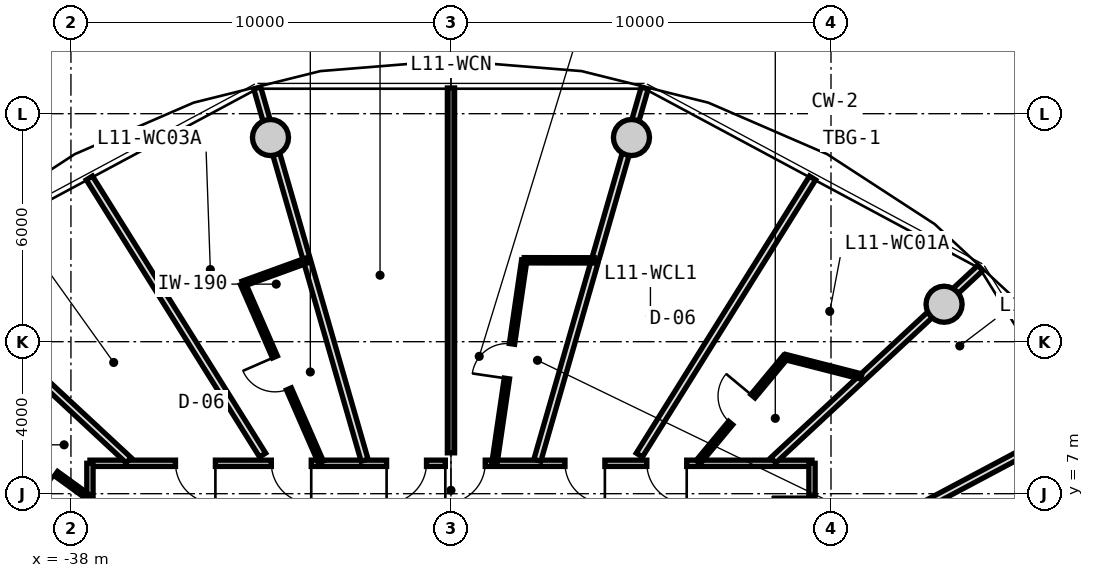
"""IFC4 building model, lengths in metres.
Left out: names, types, materials, properties, quantities, classifications, styles, units other than length and angle.
Written with IfcOpenShell. Run it as: python <this file> out.ifc"""

import sys

from ifc_helpers import new_model, si_unit, direction, frame, frame_2d, origin, origin_2d, place, context, subcontext, project, spatial, rectangle, circle, extrude, source, transform, mapped, element, fill, save


model = new_model("IFC4")
c1 = context("Model", 3, precision=1e-05, world=origin(), true_north=direction((0.0, 1.0)))
c2 = subcontext(c1, "Body", "Model", "MODEL_VIEW")
j1 = project(units=[si_unit("LENGTHUNIT", "METRE"), si_unit("PLANEANGLEUNIT", "RADIAN")], contexts=[c1])
p1 = place(None, origin())
s1 = spatial("IfcSite", under=j1, at=p1, CompositionType="ELEMENT")
p2 = place(p1, origin())
s2 = spatial("IfcBuilding", under=s1, at=p2, CompositionType="ELEMENT")
p3 = place(p2, frame((0.0, 0.0, 39.9)))
s3 = spatial("IfcBuildingStorey", under=s2, at=p3, CompositionType="ELEMENT", Elevation=39.9)
m1 = source(origin(), c2, "Body", "SweptSolid", [
    extrude(circle(Radius=0.475, at=origin_2d()), origin(), (0.0, 0.0, 1.0), 3.05),
])
for number, where, z_axis, x_axis in (
    (1, (-15.025, 11.985, 0.0), (0.0, 0.0, 1.0), (1.0, 0.0, 0.0)),
    (2, (-23.251, 16.373, 0.0), (0.0, 0.0, 1.0), (1.0, 0.0, 0.0)),
    (3, (-32.749, 16.373, 0.0), (0.0, 0.0, 1.0), (1.0, 0.0, 0.0)),
):
    element("IfcColumn", number, at=place(p3, frame(where, z_axis=z_axis, x_axis=x_axis)), inside=s3, PredefinedType="COLUMN", context=c2, shape_type="MappedRepresentation", body=[
        mapped(m1, transform((0.0, 0.0, 0.0), x_axis=(1.0, 0.0, 0.0), y_axis=(0.0, 1.0, 0.0), z_axis=(0.0, 0.0, 1.0), scale=1.0)),
    ])
m2 = source(origin(), c2, "Body", "SweptSolid", [
    extrude(rectangle(XDim=19.0, YDim=0.165, at=frame_2d((9.5, 0.0))), origin(), (0.0, 0.0, 1.0), 2.775),
])
p4 = place(p3, frame((-37.5, 7.8, 0.0), z_axis=(0.0, 0.0, 1.0), x_axis=(1.0, 0.0, 0.0)))
e4 = element("IfcWall", 4, at=p4, inside=s3, PredefinedType="PARTITIONING", context=c2, shape_type="MappedRepresentation", body=[
    mapped(m2, transform((0.0, 0.0, 0.0), x_axis=(1.0, 0.0, 0.0), y_axis=(0.0, 1.0, 0.0), z_axis=(0.0, 0.0, 1.0), scale=1.0)),
])
p5 = place(p4, frame((4.773, 0.0, 0.0)))
e5 = element("IfcOpeningElement", 5, at=p5, cuts=e4, PredefinedType="OPENING", context=c2, shape_type="SweptSolid", body=[
    extrude(rectangle(XDim=1.05, YDim=2.15, at=frame_2d((0.525, 1.075))), frame((0.0, 0.093, 0.0), z_axis=(0.0, -1.0, 0.0), x_axis=(1.0, 0.0, 0.0)), (0.0, 0.0, 1.0), 0.185),
])
p6 = place(p4, frame((2.251, 0.0, 0.0)))
e6 = element("IfcOpeningElement", 6, at=p6, cuts=e4, PredefinedType="OPENING", context=c2, shape_type="SweptSolid", body=[
    extrude(rectangle(XDim=1.05, YDim=2.15, at=frame_2d((0.525, 1.075))), frame((0.0, 0.093, 0.0), z_axis=(0.0, -1.0, 0.0), x_axis=(1.0, 0.0, 0.0)), (0.0, 0.0, 1.0), 0.185),
])
p7 = place(p4, frame((14.653, 0.0, 0.0)))
e7 = element("IfcOpeningElement", 7, at=p7, cuts=e4, PredefinedType="OPENING", context=c2, shape_type="SweptSolid", body=[
    extrude(rectangle(XDim=1.05, YDim=2.15, at=frame_2d((0.525, 1.075))), frame((0.0, 0.093, 0.0), z_axis=(0.0, -1.0, 0.0), x_axis=(1.0, 0.0, 0.0)), (0.0, 0.0, 1.0), 0.185),
])
p8 = place(p4, frame((12.5, 0.0, 0.0)))
e8 = element("IfcOpeningElement", 8, at=p8, cuts=e4, PredefinedType="OPENING", context=c2, shape_type="SweptSolid", body=[
    extrude(rectangle(XDim=1.05, YDim=2.15, at=frame_2d((0.525, 1.075))), frame((0.0, 0.093, 0.0), z_axis=(0.0, -1.0, 0.0), x_axis=(1.0, 0.0, 0.0)), (0.0, 0.0, 1.0), 0.185),
])
p9 = place(p4, frame((9.352, 0.0, 0.0)))
e9 = element("IfcOpeningElement", 9, at=p9, cuts=e4, PredefinedType="OPENING", context=c2, shape_type="SweptSolid", body=[
    extrude(rectangle(XDim=1.05, YDim=2.15, at=frame_2d((0.525, 1.075))), frame((0.0, 0.093, 0.0), z_axis=(0.0, -1.0, 0.0), x_axis=(1.0, 0.0, 0.0)), (0.0, 0.0, 1.0), 0.185),
])
p10 = place(p4, frame((7.806, 0.0, 0.0)))
e10 = element("IfcOpeningElement", 10, at=p10, cuts=e4, PredefinedType="OPENING", context=c2, shape_type="SweptSolid", body=[
    extrude(rectangle(XDim=1.05, YDim=2.15, at=frame_2d((0.525, 1.075))), frame((0.0, 0.093, 0.0), z_axis=(0.0, -1.0, 0.0), x_axis=(1.0, 0.0, 0.0)), (0.0, 0.0, 1.0), 0.185),
])
m3 = source(origin(), c2, "Body", "SweptSolid", [
    extrude(rectangle(XDim=15.6, YDim=0.165, at=frame_2d((7.8, 0.0))), origin(), (0.0, 0.0, 1.0), 2.775),
])
p11 = place(p3, frame((-37.5, -7.8, 0.0), z_axis=(0.0, 0.0, 1.0), x_axis=(0.0, 1.0, 0.0)))
e11 = element("IfcWall", 11, at=p11, inside=s3, PredefinedType="PARTITIONING", context=c2, shape_type="MappedRepresentation", body=[
    mapped(m3, transform((0.0, 0.0, 0.0), x_axis=(1.0, 0.0, 0.0), y_axis=(0.0, 1.0, 0.0), z_axis=(0.0, 0.0, 1.0), scale=1.0)),
])
p12 = place(p11, frame((13.293, 0.0, 0.0)))
e12 = element("IfcOpeningElement", 12, at=p12, cuts=e11, PredefinedType="OPENING", context=c2, shape_type="SweptSolid", body=[
    extrude(rectangle(XDim=1.05, YDim=2.15, at=frame_2d((0.525, 1.075))), frame((0.0, 0.093, 0.0), z_axis=(0.0, -1.0, 0.0), x_axis=(1.0, 0.0, 0.0)), (0.0, 0.0, 1.0), 0.185),
])
p13 = place(p11, frame((11.018, 0.0, 0.0)))
e13 = element("IfcOpeningElement", 13, at=p13, cuts=e11, PredefinedType="OPENING", context=c2, shape_type="SweptSolid", body=[
    extrude(rectangle(XDim=1.05, YDim=2.15, at=frame_2d((0.525, 1.075))), frame((0.0, 0.093, 0.0), z_axis=(0.0, -1.0, 0.0), x_axis=(1.0, 0.0, 0.0)), (0.0, 0.0, 1.0), 0.185),
])
p14 = place(p11, frame((7.812, 0.0, 0.0)))
e14 = element("IfcOpeningElement", 14, at=p14, cuts=e11, PredefinedType="OPENING", context=c2, shape_type="SweptSolid", body=[
    extrude(rectangle(XDim=1.05, YDim=2.15, at=frame_2d((0.525, 1.075))), frame((0.0, 0.093, 0.0), z_axis=(0.0, -1.0, 0.0), x_axis=(1.0, 0.0, 0.0)), (0.0, 0.0, 1.0), 0.185),
])
p15 = place(p11, frame((6.035, 0.0, 0.0)))
e15 = element("IfcOpeningElement", 15, at=p15, cuts=e11, PredefinedType="OPENING", context=c2, shape_type="SweptSolid", body=[
    extrude(rectangle(XDim=1.05, YDim=2.15, at=frame_2d((0.525, 1.075))), frame((0.0, 0.093, 0.0), z_axis=(0.0, -1.0, 0.0), x_axis=(1.0, 0.0, 0.0)), (0.0, 0.0, 1.0), 0.185),
])
p16 = place(p11, frame((3.489, 0.0, 0.0)))
e16 = element("IfcOpeningElement", 16, at=p16, cuts=e11, PredefinedType="OPENING", context=c2, shape_type="SweptSolid", body=[
    extrude(rectangle(XDim=1.05, YDim=2.15, at=frame_2d((0.525, 1.075))), frame((0.0, 0.093, 0.0), z_axis=(0.0, -1.0, 0.0), x_axis=(1.0, 0.0, 0.0)), (0.0, 0.0, 1.0), 0.185),
])
p17 = place(p11, frame((0.882, 0.0, 0.0)))
e17 = element("IfcOpeningElement", 17, at=p17, cuts=e11, PredefinedType="OPENING", context=c2, shape_type="SweptSolid", body=[
    extrude(rectangle(XDim=1.05, YDim=2.15, at=frame_2d((0.525, 1.075))), frame((0.0, 0.093, 0.0), z_axis=(0.0, -1.0, 0.0), x_axis=(1.0, 0.0, 0.0)), (0.0, 0.0, 1.0), 0.185),
])
p18 = place(p3, frame((-18.5, 7.8, 0.0), z_axis=(0.0, 0.0, 1.0), x_axis=(0.0, -1.0, 0.0)))
e18 = element("IfcWall", 18, at=p18, inside=s3, PredefinedType="PARTITIONING", context=c2, shape_type="MappedRepresentation", body=[
    mapped(m3, transform((0.0, 0.0, 0.0), x_axis=(1.0, 0.0, 0.0), y_axis=(0.0, 1.0, 0.0), z_axis=(0.0, 0.0, 1.0), scale=1.0)),
])
p19 = place(p18, frame((12.141, 0.0, 0.0)))
e19 = element("IfcOpeningElement", 19, at=p19, cuts=e18, PredefinedType="OPENING", context=c2, shape_type="SweptSolid", body=[
    extrude(rectangle(XDim=1.25, YDim=2.2, at=frame_2d((0.625, 1.1))), frame((0.0, 0.093, 0.0), z_axis=(0.0, -1.0, 0.0), x_axis=(1.0, 0.0, 0.0)), (0.0, 0.0, 1.0), 0.185),
])
p20 = place(p18, frame((7.175, 0.0, 0.0)))
e20 = element("IfcOpeningElement", 20, at=p20, cuts=e18, PredefinedType="OPENING", context=c2, shape_type="SweptSolid", body=[
    extrude(rectangle(XDim=1.25, YDim=2.2, at=frame_2d((0.625, 1.1))), frame((0.0, 0.093, 0.0), z_axis=(0.0, -1.0, 0.0), x_axis=(1.0, 0.0, 0.0)), (0.0, 0.0, 1.0), 0.185),
])
p21 = place(p18, frame((2.826, 0.0, 0.0)))
e21 = element("IfcOpeningElement", 21, at=p21, cuts=e18, PredefinedType="OPENING", context=c2, shape_type="SweptSolid", body=[
    extrude(rectangle(XDim=1.05, YDim=2.15, at=frame_2d((0.525, 1.075))), frame((0.0, 0.093, 0.0), z_axis=(0.0, -1.0, 0.0), x_axis=(1.0, 0.0, 0.0)), (0.0, 0.0, 1.0), 0.185),
])
p22 = place(p18, frame((0.881, 0.0, 0.0)))
e22 = element("IfcOpeningElement", 22, at=p22, cuts=e18, PredefinedType="OPENING", context=c2, shape_type="SweptSolid", body=[
    extrude(rectangle(XDim=1.05, YDim=2.15, at=frame_2d((0.525, 1.075))), frame((0.0, 0.093, 0.0), z_axis=(0.0, -1.0, 0.0), x_axis=(1.0, 0.0, 0.0)), (0.0, 0.0, 1.0), 0.185),
])
m4 = source(origin(), c2, "Body", "SweptSolid", [
    extrude(rectangle(XDim=10.196, YDim=0.19, at=frame_2d((5.098, 0.0))), origin(), (0.0, 0.0, 1.0), 2.225),
])
p23 = place(p3, frame((-30.273, 7.88, 0.0), z_axis=(0.0, 0.0, 1.0), x_axis=(-0.277136420347, 0.960830580549, 0.0)))
e23 = element("IfcWall", 23, at=p23, inside=s3, PredefinedType="PARTITIONING", context=c2, shape_type="MappedRepresentation", body=[
    mapped(m4, transform((0.0, 0.0, 0.0), x_axis=(1.0, 0.0, 0.0), y_axis=(0.0, 1.0, 0.0), z_axis=(0.0, 0.0, 1.0), scale=1.0)),
])
m5 = source(origin(), c2, "Body", "SweptSolid", [
    extrude(rectangle(XDim=7.435, YDim=0.19, at=frame_2d((3.717, 0.0))), origin(), (0.0, 0.0, 1.0), 2.225),
])
p24 = place(p3, frame((-36.483, 7.88, 0.0), z_axis=(0.0, 0.0, 1.0), x_axis=(-0.732651956848, 0.680603489652, 0.0)))
e24 = element("IfcWall", 24, at=p24, inside=s3, PredefinedType="PARTITIONING", context=c2, shape_type="MappedRepresentation", body=[
    mapped(m5, transform((0.0, 0.0, 0.0), x_axis=(1.0, 0.0, 0.0), y_axis=(0.0, 1.0, 0.0), z_axis=(0.0, 0.0, 1.0), scale=1.0)),
])
m6 = source(origin(), c2, "Body", "SweptSolid", [
    extrude(rectangle(XDim=8.598, YDim=0.19, at=frame_2d((4.299, 0.0))), origin(), (0.0, 0.0, 1.0), 2.775),
])
p25 = place(p3, frame((-32.957, 8.017, 0.0), z_axis=(0.0, 0.0, 1.0), x_axis=(-0.530039776395, 0.847972779893, 0.0)))
e25 = element("IfcWall", 25, at=p25, inside=s3, PredefinedType="PARTITIONING", context=c2, shape_type="MappedRepresentation", body=[
    mapped(m6, transform((0.0, 0.0, 0.0), x_axis=(1.0, 0.0, 0.0), y_axis=(0.0, 1.0, 0.0), z_axis=(0.0, 0.0, 1.0), scale=1.0)),
])
m7 = source(origin(), c2, "Body", "SweptSolid", [
    extrude(rectangle(XDim=5.126, YDim=0.14, at=frame_2d((2.563, 0.0))), origin(), (0.0, 0.0, 1.0), 2.775),
])
p26 = place(p3, frame((-31.422, 7.83, 0.0), z_axis=(0.0, 0.0, 1.0), x_axis=(-0.400473994842, 0.916308124735, 0.0)))
e26 = element("IfcWall", 26, at=p26, inside=s3, PredefinedType="PARTITIONING", context=c2, shape_type="MappedRepresentation", body=[
    mapped(m7, transform((0.0, 0.0, 0.0), x_axis=(1.0, 0.0, 0.0), y_axis=(0.0, 1.0, 0.0), z_axis=(0.0, 0.0, 1.0), scale=1.0)),
])
p27 = place(p26, frame((2.103, 0.0, 0.0)))
e27 = element("IfcOpeningElement", 27, at=p27, cuts=e26, PredefinedType="OPENING", context=c2, shape_type="SweptSolid", body=[
    extrude(rectangle(XDim=0.92, YDim=2.1, at=frame_2d((0.46, 1.05))), frame((0.0, 0.08, 0.0), z_axis=(0.0, -1.0, 0.0), x_axis=(1.0, 0.0, 0.0)), (0.0, 0.0, 1.0), 0.16),
])
m8 = source(origin(), c2, "Body", "SweptSolid", [
    extrude(rectangle(XDim=1.811, YDim=0.14, at=frame_2d((0.906, 0.0))), origin(), (0.0, 0.0, 1.0), 2.775),
])
p28 = place(p3, frame((-33.475, 12.527, 0.0), z_axis=(0.0, 0.0, 1.0), x_axis=(0.940009682452, 0.341147764021, 0.0)))
e28 = element("IfcWall", 28, at=p28, inside=s3, PredefinedType="PARTITIONING", context=c2, shape_type="MappedRepresentation", body=[
    mapped(m8, transform((0.0, 0.0, 0.0), x_axis=(1.0, 0.0, 0.0), y_axis=(0.0, 1.0, 0.0), z_axis=(0.0, 0.0, 1.0), scale=1.0)),
])
m9 = source(origin(), c2, "Body", "SweptSolid", [
    extrude(rectangle(XDim=7.677, YDim=0.19, at=frame_2d((3.838, 0.0))), origin(), (0.0, 0.0, 1.0), 2.775),
])
p29 = place(p3, frame((-37.703, 5.231, 0.0), z_axis=(0.0, 0.0, 1.0), x_axis=(-0.882725057546, 0.469889851753, 0.0)))
e29 = element("IfcWall", 29, at=p29, inside=s3, PredefinedType="PARTITIONING", context=c2, shape_type="MappedRepresentation", body=[
    mapped(m9, transform((0.0, 0.0, 0.0), x_axis=(1.0, 0.0, 0.0), y_axis=(0.0, 1.0, 0.0), z_axis=(0.0, 0.0, 1.0), scale=1.0)),
])
m10 = source(origin(), c2, "Body", "SweptSolid", [
    extrude(rectangle(XDim=3.051, YDim=0.14, at=frame_2d((1.525, 0.0))), origin(), (0.0, 0.0, 1.0), 2.775),
])
p30 = place(p3, frame((-37.53, 6.903, 0.0), z_axis=(0.0, 0.0, 1.0), x_axis=(-0.809849031404, 0.586638343729, 0.0)))
e30 = element("IfcWall", 30, at=p30, inside=s3, PredefinedType="PARTITIONING", context=c2, shape_type="MappedRepresentation", body=[
    mapped(m10, transform((0.0, 0.0, 0.0), x_axis=(1.0, 0.0, 0.0), y_axis=(0.0, 1.0, 0.0), z_axis=(0.0, 0.0, 1.0), scale=1.0)),
])
p31 = place(p30, frame((1.065, 0.0, 0.0)))
e31 = element("IfcOpeningElement", 31, at=p31, cuts=e30, PredefinedType="OPENING", context=c2, shape_type="SweptSolid", body=[
    extrude(rectangle(XDim=0.92, YDim=2.1, at=frame_2d((0.46, 1.05))), frame((0.0, 0.08, 0.0), z_axis=(0.0, -1.0, 0.0), x_axis=(1.0, 0.0, 0.0)), (0.0, 0.0, 1.0), 0.16),
])
p32 = place(p3, frame((-19.517, 7.88, 0.0), z_axis=(0.0, 0.0, 1.0), x_axis=(0.732651956848, 0.680603489652, 0.0)))
e32 = element("IfcWall", 32, at=p32, inside=s3, PredefinedType="PARTITIONING", context=c2, shape_type="MappedRepresentation", body=[
    mapped(m5, transform((0.0, 0.0, 0.0), x_axis=(1.0, 0.0, 0.0), y_axis=(0.0, 1.0, 0.0), z_axis=(0.0, 0.0, 1.0), scale=1.0)),
])
p33 = place(p3, frame((-18.297, 5.231, 0.0), z_axis=(0.0, 0.0, 1.0), x_axis=(0.882725057546, 0.469889851753, 0.0)))
e33 = element("IfcWall", 33, at=p33, inside=s3, PredefinedType="PARTITIONING", context=c2, shape_type="MappedRepresentation", body=[
    mapped(m9, transform((0.0, 0.0, 0.0), x_axis=(1.0, 0.0, 0.0), y_axis=(0.0, 1.0, 0.0), z_axis=(0.0, 0.0, 1.0), scale=1.0)),
])
p34 = place(p3, frame((-25.727, 7.88, 0.0), z_axis=(0.0, 0.0, 1.0), x_axis=(0.277136420347, 0.960830580549, 0.0)))
e34 = element("IfcWall", 34, at=p34, inside=s3, PredefinedType="PARTITIONING", context=c2, shape_type="MappedRepresentation", body=[
    mapped(m4, transform((0.0, 0.0, 0.0), x_axis=(1.0, 0.0, 0.0), y_axis=(0.0, 1.0, 0.0), z_axis=(0.0, 0.0, 1.0), scale=1.0)),
])
p35 = place(p3, frame((-23.043, 8.017, 0.0), z_axis=(0.0, 0.0, 1.0), x_axis=(0.530039776395, 0.847972779893, 0.0)))
e35 = element("IfcWall", 35, at=p35, inside=s3, PredefinedType="PARTITIONING", context=c2, shape_type="MappedRepresentation", body=[
    mapped(m6, transform((0.0, 0.0, 0.0), x_axis=(1.0, 0.0, 0.0), y_axis=(0.0, 1.0, 0.0), z_axis=(0.0, 0.0, 1.0), scale=1.0)),
])
m11 = source(origin(), c2, "Body", "SweptSolid", [
    extrude(rectangle(XDim=3.594, YDim=0.14, at=frame_2d((1.797, 0.0))), origin(), (0.0, 0.0, 1.0), 2.775),
])
p36 = place(p3, frame((-21.496, 7.83, 0.0), z_axis=(0.0, 0.0, 1.0), x_axis=(0.639001147083, 0.769205781326, 0.0)))
e36 = element("IfcWall", 36, at=p36, inside=s3, PredefinedType="PARTITIONING", context=c2, shape_type="MappedRepresentation", body=[
    mapped(m11, transform((0.0, 0.0, 0.0), x_axis=(1.0, 0.0, 0.0), y_axis=(0.0, 1.0, 0.0), z_axis=(0.0, 0.0, 1.0), scale=1.0)),
])
p37 = place(p36, frame((1.337, 0.0, 0.0)))
e37 = element("IfcOpeningElement", 37, at=p37, cuts=e36, PredefinedType="OPENING", context=c2, shape_type="SweptSolid", body=[
    extrude(rectangle(XDim=0.92, YDim=2.1, at=frame_2d((0.46, 1.05))), frame((0.0, 0.08, 0.0), z_axis=(0.0, -1.0, 0.0), x_axis=(1.0, 0.0, 0.0)), (0.0, 0.0, 1.0), 0.16),
])
m12 = source(origin(), c2, "Body", "SweptSolid", [
    extrude(rectangle(XDim=2.062, YDim=0.14, at=frame_2d((1.031, 0.0))), origin(), (0.0, 0.0, 1.0), 2.415),
])
p38 = place(p3, frame((-19.199, 10.595, 0.0), z_axis=(0.0, 0.0, 1.0), x_axis=(0.968776253543, -0.247936626121, 0.0)))
e38 = element("IfcWall", 38, at=p38, inside=s3, PredefinedType="PARTITIONING", context=c2, shape_type="MappedRepresentation", body=[
    mapped(m12, transform((0.0, 0.0, 0.0), x_axis=(1.0, 0.0, 0.0), y_axis=(0.0, 1.0, 0.0), z_axis=(0.0, 0.0, 1.0), scale=1.0)),
])
m13 = source(origin(), c2, "Body", "SweptSolid", [
    extrude(rectangle(XDim=9.601, YDim=0.19, at=frame_2d((4.8, 0.0))), origin(), (0.0, 0.0, 1.0), 2.775),
])
p39 = place(p3, frame((-28.0, 8.076, 0.0), z_axis=(0.0, 0.0, 1.0), x_axis=(0.0, 1.0, 0.0)))
e39 = element("IfcWall", 39, at=p39, inside=s3, PredefinedType="PARTITIONING", context=c2, shape_type="MappedRepresentation", body=[
    mapped(m13, transform((0.0, 0.0, 0.0), x_axis=(1.0, 0.0, 0.0), y_axis=(0.0, 1.0, 0.0), z_axis=(0.0, 0.0, 1.0), scale=1.0)),
])
m14 = source(origin(), c2, "Body", "SweptSolid", [
    extrude(rectangle(XDim=5.37, YDim=0.14, at=frame_2d((2.685, 0.0))), origin(), (0.0, 0.0, 1.0), 2.775),
])
p40 = place(p3, frame((-26.851, 7.83, 0.0), z_axis=(0.0, 0.0, 1.0), x_axis=(0.145131397853, 0.989412389935, 0.0)))
e40 = element("IfcWall", 40, at=p40, inside=s3, PredefinedType="PARTITIONING", context=c2, shape_type="MappedRepresentation", body=[
    mapped(m14, transform((0.0, 0.0, 0.0), x_axis=(1.0, 0.0, 0.0), y_axis=(0.0, 1.0, 0.0), z_axis=(0.0, 0.0, 1.0), scale=1.0)),
])
p41 = place(p40, frame((2.225, 0.0, 0.0)))
e41 = element("IfcOpeningElement", 41, at=p41, cuts=e40, PredefinedType="OPENING", context=c2, shape_type="SweptSolid", body=[
    extrude(rectangle(XDim=0.92, YDim=2.1, at=frame_2d((0.46, 1.05))), frame((0.0, 0.08, 0.0), z_axis=(0.0, -1.0, 0.0), x_axis=(1.0, 0.0, 0.0)), (0.0, 0.0, 1.0), 0.16),
])
m15 = source(origin(), c2, "Body", "SweptSolid", [
    extrude(rectangle(XDim=1.843, YDim=0.14, at=frame_2d((0.921, 0.0))), origin(), (0.0, 0.0, 1.0), 2.775),
])
p42 = place(p3, frame((-26.072, 13.143, 0.0), z_axis=(0.0, 0.0, 1.0), x_axis=(0.999998937801, -0.001457531246, 0.0)))
e42 = element("IfcWall", 42, at=p42, inside=s3, PredefinedType="PARTITIONING", context=c2, shape_type="MappedRepresentation", body=[
    mapped(m15, transform((0.0, 0.0, 0.0), x_axis=(1.0, 0.0, 0.0), y_axis=(0.0, 1.0, 0.0), z_axis=(0.0, 0.0, 1.0), scale=1.0)),
])
m16 = source(origin(), c2, "Body", "SweptSolid", [
    extrude(rectangle(XDim=1.05, YDim=2.15, at=frame_2d((0.525, 1.075))), frame((0.0, 0.025, 0.0), z_axis=(0.0, -1.0, 0.0), x_axis=(1.0, 0.0, 0.0)), (0.0, 0.0, 1.0), 0.05),
])
p43 = place(p5, frame((1.05, 0.0, 0.0), z_axis=(0.0, 0.0, 1.0), x_axis=(-1.0, 0.0, 0.0)))
e43 = element("IfcDoor", 43, at=p43, inside=s3, OperationType="SINGLE_SWING_LEFT", PredefinedType="DOOR", context=c2, shape_type="MappedRepresentation", body=[
    mapped(m16, transform((0.0, 0.0, 0.0), x_axis=(1.0, 0.0, 0.0), y_axis=(0.0, 1.0, 0.0), z_axis=(0.0, 0.0, 1.0), scale=1.0)),
])
fill(e5, e43)
m17 = source(origin(), c2, "Body", "SweptSolid", [
    extrude(rectangle(XDim=0.92, YDim=2.1, at=frame_2d((0.46, 1.05))), frame((0.0, 0.025, 0.0), z_axis=(0.0, -1.0, 0.0), x_axis=(1.0, 0.0, 0.0)), (0.0, 0.0, 1.0), 0.05),
])
p44 = place(p27, origin())
e44 = element("IfcDoor", 44, at=p44, inside=s3, OperationType="SINGLE_SWING_RIGHT", PredefinedType="DOOR", context=c2, shape_type="MappedRepresentation", body=[
    mapped(m17, transform((0.0, 0.0, 0.0), x_axis=(1.0, 0.0, 0.0), y_axis=(0.0, 1.0, 0.0), z_axis=(0.0, 0.0, 1.0), scale=1.0)),
])
fill(e27, e44)
p45 = place(p6, frame((1.05, 0.0, 0.0), z_axis=(0.0, 0.0, 1.0), x_axis=(-1.0, 0.0, 0.0)))
e45 = element("IfcDoor", 45, at=p45, inside=s3, OperationType="SINGLE_SWING_LEFT", PredefinedType="DOOR", context=c2, shape_type="MappedRepresentation", body=[
    mapped(m16, transform((0.0, 0.0, 0.0), x_axis=(1.0, 0.0, 0.0), y_axis=(0.0, 1.0, 0.0), z_axis=(0.0, 0.0, 1.0), scale=1.0)),
])
fill(e6, e45)
p46 = place(p31, origin())
e46 = element("IfcDoor", 46, at=p46, inside=s3, OperationType="SINGLE_SWING_LEFT", PredefinedType="DOOR", context=c2, shape_type="MappedRepresentation", body=[
    mapped(m17, transform((0.0, 0.0, 0.0), x_axis=(1.0, 0.0, 0.0), y_axis=(0.0, 1.0, 0.0), z_axis=(0.0, 0.0, 1.0), scale=1.0)),
])
fill(e31, e46)
p47 = place(p22, frame((1.05, 0.0, 0.0), z_axis=(0.0, 0.0, 1.0), x_axis=(-1.0, 0.0, 0.0)))
e47 = element("IfcDoor", 47, at=p47, inside=s3, OperationType="SINGLE_SWING_RIGHT", PredefinedType="DOOR", context=c2, shape_type="MappedRepresentation", body=[
    mapped(m16, transform((0.0, 0.0, 0.0), x_axis=(1.0, 0.0, 0.0), y_axis=(0.0, 1.0, 0.0), z_axis=(0.0, 0.0, 1.0), scale=1.0)),
])
fill(e22, e47)
p48 = place(p7, frame((1.05, 0.0, 0.0), z_axis=(0.0, 0.0, 1.0), x_axis=(-1.0, 0.0, 0.0)))
e48 = element("IfcDoor", 48, at=p48, inside=s3, OperationType="SINGLE_SWING_LEFT", PredefinedType="DOOR", context=c2, shape_type="MappedRepresentation", body=[
    mapped(m16, transform((0.0, 0.0, 0.0), x_axis=(1.0, 0.0, 0.0), y_axis=(0.0, 1.0, 0.0), z_axis=(0.0, 0.0, 1.0), scale=1.0)),
])
fill(e7, e48)
p49 = place(p37, origin())
e49 = element("IfcDoor", 49, at=p49, inside=s3, OperationType="SINGLE_SWING_RIGHT", PredefinedType="DOOR", context=c2, shape_type="MappedRepresentation", body=[
    mapped(m17, transform((0.0, 0.0, 0.0), x_axis=(1.0, 0.0, 0.0), y_axis=(0.0, 1.0, 0.0), z_axis=(0.0, 0.0, 1.0), scale=1.0)),
])
fill(e37, e49)
p50 = place(p8, frame((1.05, 0.0, 0.0), z_axis=(0.0, 0.0, 1.0), x_axis=(-1.0, 0.0, 0.0)))
e50 = element("IfcDoor", 50, at=p50, inside=s3, OperationType="SINGLE_SWING_LEFT", PredefinedType="DOOR", context=c2, shape_type="MappedRepresentation", body=[
    mapped(m16, transform((0.0, 0.0, 0.0), x_axis=(1.0, 0.0, 0.0), y_axis=(0.0, 1.0, 0.0), z_axis=(0.0, 0.0, 1.0), scale=1.0)),
])
fill(e8, e50)
p51 = place(p9, frame((1.05, 0.0, 0.0), z_axis=(0.0, 0.0, 1.0), x_axis=(-1.0, 0.0, 0.0)))
e51 = element("IfcDoor", 51, at=p51, inside=s3, OperationType="SINGLE_SWING_RIGHT", PredefinedType="DOOR", context=c2, shape_type="MappedRepresentation", body=[
    mapped(m16, transform((0.0, 0.0, 0.0), x_axis=(1.0, 0.0, 0.0), y_axis=(0.0, 1.0, 0.0), z_axis=(0.0, 0.0, 1.0), scale=1.0)),
])
fill(e9, e51)
p52 = place(p41, origin())
e52 = element("IfcDoor", 52, at=p52, inside=s3, OperationType="SINGLE_SWING_LEFT", PredefinedType="DOOR", context=c2, shape_type="MappedRepresentation", body=[
    mapped(m17, transform((0.0, 0.0, 0.0), x_axis=(1.0, 0.0, 0.0), y_axis=(0.0, 1.0, 0.0), z_axis=(0.0, 0.0, 1.0), scale=1.0)),
])
fill(e41, e52)
p53 = place(p10, frame((1.05, 0.0, 0.0), z_axis=(0.0, 0.0, 1.0), x_axis=(-1.0, 0.0, 0.0)))
e53 = element("IfcDoor", 53, at=p53, inside=s3, OperationType="SINGLE_SWING_RIGHT", PredefinedType="DOOR", context=c2, shape_type="MappedRepresentation", body=[
    mapped(m16, transform((0.0, 0.0, 0.0), x_axis=(1.0, 0.0, 0.0), y_axis=(0.0, 1.0, 0.0), z_axis=(0.0, 0.0, 1.0), scale=1.0)),
])
fill(e10, e53)
save(model, sys.argv[1])
